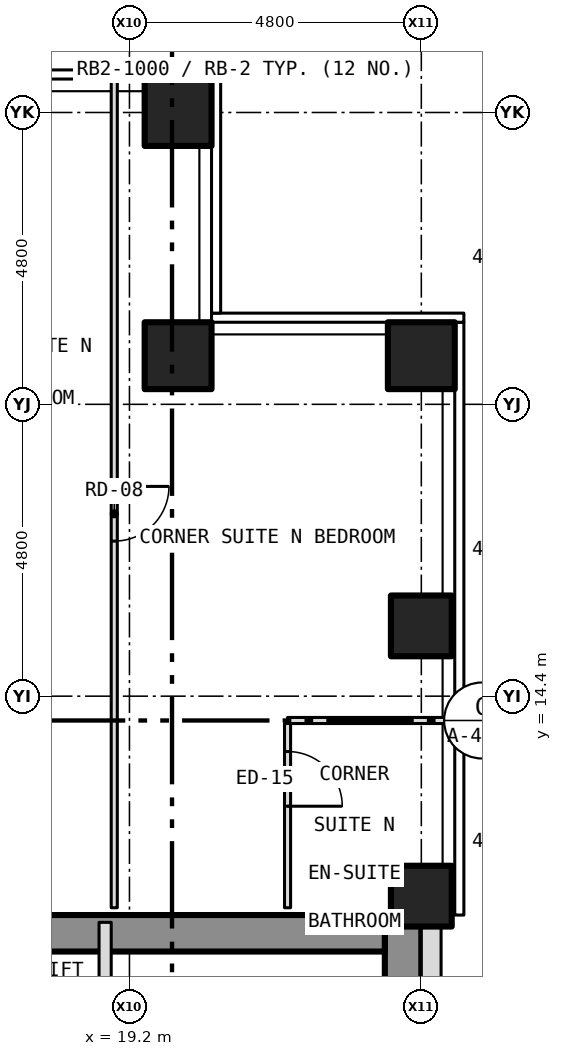
"""IFC4 building model, lengths in metres.
Left out: names, types, materials, properties, quantities, classifications, styles, units other than length and angle.
Written with IfcOpenShell. Run it as: python <this file> out.ifc"""

import sys

from ifc_helpers import new_model, si_unit, direction, frame, frame_2d, origin, origin_2d, place, context, subcontext, project, spatial, rectangle, hollow_rectangle, extrude, element, fill, save


model = new_model("IFC4")
c1 = context("Model", 3, precision=1e-05, world=origin(), true_north=direction((0.0, 1.0)))
c2 = subcontext(c1, "Body", "Model", "MODEL_VIEW")
j1 = project(units=[si_unit("LENGTHUNIT", "METRE"), si_unit("PLANEANGLEUNIT", "RADIAN")], contexts=[c1])
p1 = place(None, origin())
s1 = spatial("IfcSite", under=j1, at=p1, CompositionType="ELEMENT")
p2 = place(p1, origin())
s2 = spatial("IfcBuilding", under=s1, at=p2, CompositionType="ELEMENT")
p3 = place(p2, frame((0.0, 0.0, 39.0)))
s3 = spatial("IfcBuildingStorey", under=s2, at=p3, CompositionType="ELEMENT", Elevation=39.0)
p4 = place(p3, frame((20.0, 24.0, -0.15), z_axis=(0.0, 0.0, 1.0), x_axis=(1.0, 0.0, 0.0)))
e1 = element("IfcColumn", 1, at=p4, inside=s3, PredefinedType="COLUMN", context=c2, shape_type="SweptSolid", body=[
    extrude(hollow_rectangle(XDim=1.1, YDim=1.1, WallThickness=0.065, at=origin_2d()), origin(), (0.0, 0.0, 1.0), 3.5),
])
for number, where, z_axis, x_axis in (
    (2, (24.0, 11.111, -0.15), (0.0, 0.0, 1.0), (1.0, 0.0, 0.0)),
    (3, (24.0, 15.556, -0.15), (0.0, 0.0, 1.0), (1.0, 0.0, 0.0)),
):
    element("IfcColumn", number, at=place(p3, frame(where, z_axis=z_axis, x_axis=x_axis)), inside=s3, PredefinedType="COLUMN", context=c2, shape_type="SweptSolid", body=[
        extrude(hollow_rectangle(XDim=1.0, YDim=1.0, WallThickness=0.06, at=origin_2d()), origin(), (0.0, 0.0, 1.0), 3.5),
    ])
for number, where, z_axis, x_axis in (
    (4, (24.0, 20.0, -0.15), (0.0, 0.0, 1.0), (1.0, 0.0, 0.0)),
    (5, (20.0, 20.0, -0.15), (0.0, 0.0, 1.0), (1.0, 0.0, 0.0)),
):
    element("IfcColumn", number, at=place(p3, frame(where, z_axis=z_axis, x_axis=x_axis)), inside=s3, PredefinedType="COLUMN", context=c2, shape_type="SweptSolid", body=[
        extrude(hollow_rectangle(XDim=1.1, YDim=1.1, WallThickness=0.065, at=origin_2d()), origin(), (0.0, 0.0, 1.0), 3.5),
    ])
p5 = place(p3, frame((23.7, -10.8, 0.0), z_axis=(0.0, 0.0, 1.0), x_axis=(0.0, 1.0, 0.0)))
e6 = element("IfcWall", 6, at=p5, inside=s3, PredefinedType="SHEAR", context=c2, shape_type="SweptSolid", body=[
    extrude(rectangle(XDim=21.6, YDim=0.6, at=frame_2d((10.8, 0.0))), origin(), (0.0, 0.0, 1.0), 3.25),
])
p6 = place(p3, frame((16.4, 10.5, 0.0), z_axis=(0.0, 0.0, 1.0), x_axis=(1.0, 0.0, 0.0)))
e7 = element("IfcWall", 7, at=p6, inside=s3, PredefinedType="SHEAR", context=c2, shape_type="SweptSolid", body=[
    extrude(rectangle(XDim=7.0, YDim=0.6, at=frame_2d((3.5, 0.0))), origin(), (0.0, 0.0, 1.0), 3.25),
])
p7 = place(p3, frame((24.163, -10.8, 0.0), z_axis=(0.0, 0.0, 1.0), x_axis=(0.0, 1.0, 0.0)))
e8 = element("IfcWall", 8, at=p7, inside=s3, PredefinedType="SOLIDWALL", context=c2, shape_type="SweptSolid", body=[
    extrude(rectangle(XDim=21.6, YDim=0.325, at=frame_2d((10.8, 0.0))), origin(), (0.0, 0.0, 1.0), 3.5),
])
p8 = place(p7, frame((2.95, 0.0, 1.0)))
e9 = element("IfcOpeningElement", 9, at=p8, cuts=e8, PredefinedType="OPENING", context=c2, shape_type="SweptSolid", body=[
    extrude(rectangle(XDim=0.6, YDim=1.5, at=frame_2d((0.3, 0.75))), frame((0.0, 0.175, 0.0), z_axis=(0.0, -1.0, 0.0), x_axis=(1.0, 0.0, 0.0)), (0.0, 0.0, 1.0), 0.349),
])
p9 = place(p3, frame((21.8, 14.0, 0.0), z_axis=(0.0, 0.0, 1.0), x_axis=(1.0, 0.0, 0.0)))
e10 = element("IfcWall", 10, at=p9, inside=s3, PredefinedType="PARTITIONING", context=c2, shape_type="SweptSolid", body=[
    extrude(rectangle(XDim=2.78, YDim=0.1, at=frame_2d((1.39, 0.0))), origin(), (0.0, 0.0, 1.0), 3.35),
])
p10 = place(p3, frame((18.8, -1.8, 0.0), z_axis=(0.0, 0.0, 1.0), x_axis=(0.0, 1.0, 0.0)))
e11 = element("IfcWall", 11, at=p10, inside=s3, PredefinedType="PARTITIONING", context=c2, shape_type="SweptSolid", body=[
    extrude(rectangle(XDim=12.48, YDim=0.2, at=frame_2d((6.24, 0.0))), origin(), (0.0, 0.0, 1.0), 3.25),
])
p11 = place(p3, frame((18.95, 10.92, 0.0), z_axis=(0.0, 0.0, 1.0), x_axis=(0.0, 1.0, 0.0)))
e12 = element("IfcWall", 12, at=p11, inside=s3, PredefinedType="PARTITIONING", context=c2, shape_type="SweptSolid", body=[
    extrude(rectangle(XDim=13.66, YDim=0.1, at=frame_2d((6.83, 0.0))), origin(), (0.0, 0.0, 1.0), 3.35),
])
p12 = place(p11, frame((6.03, 0.0, 0.0)))
e13 = element("IfcOpeningElement", 13, at=p12, cuts=e12, PredefinedType="OPENING", context=c2, shape_type="SweptSolid", body=[
    extrude(rectangle(XDim=0.9, YDim=2.1, at=frame_2d((0.45, 1.05))), frame((0.0, 0.062, 0.0), z_axis=(0.0, -1.0, 0.0), x_axis=(1.0, 0.0, 0.0)), (0.0, 0.0, 1.0), 0.124),
])
p13 = place(p3, frame((21.8, 10.92, 0.0), z_axis=(0.0, 0.0, 1.0), x_axis=(0.0, 1.0, 0.0)))
e14 = element("IfcWall", 14, at=p13, inside=s3, PredefinedType="PARTITIONING", context=c2, shape_type="SweptSolid", body=[
    extrude(rectangle(XDim=3.03, YDim=0.1, at=frame_2d((1.515, 0.0))), origin(), (0.0, 0.0, 1.0), 3.35),
])
p14 = place(p13, frame((1.67, 0.0, 0.0)))
e15 = element("IfcOpeningElement", 15, at=p14, cuts=e14, PredefinedType="OPENING", context=c2, shape_type="SweptSolid", body=[
    extrude(rectangle(XDim=0.9, YDim=2.1, at=frame_2d((0.45, 1.05))), frame((0.0, 0.062, 0.0), z_axis=(0.0, -1.0, 0.0), x_axis=(1.0, 0.0, 0.0)), (0.0, 0.0, 1.0), 0.124),
])
p15 = place(p12, origin())
e16 = element("IfcDoor", 16, at=p15, inside=s3, OperationType="SINGLE_SWING_RIGHT", PredefinedType="DOOR", context=c2, shape_type="SweptSolid", body=[
    extrude(rectangle(XDim=0.9, YDim=2.1, at=frame_2d((0.45, 1.05))), frame((0.0, 0.025, 0.0), z_axis=(0.0, -1.0, 0.0), x_axis=(1.0, 0.0, 0.0)), (0.0, 0.0, 1.0), 0.05),
])
fill(e13, e16)
p16 = place(p14, origin())
e17 = element("IfcDoor", 17, at=p16, inside=s3, OperationType="SINGLE_SWING_LEFT", PredefinedType="DOOR", context=c2, shape_type="SweptSolid", body=[
    extrude(rectangle(XDim=0.9, YDim=2.1, at=frame_2d((0.45, 1.05))), frame((0.0, 0.025, 0.0), z_axis=(0.0, -1.0, 0.0), x_axis=(1.0, 0.0, 0.0)), (0.0, 0.0, 1.0), 0.05),
])
fill(e15, e17)
save(model, sys.argv[1])
